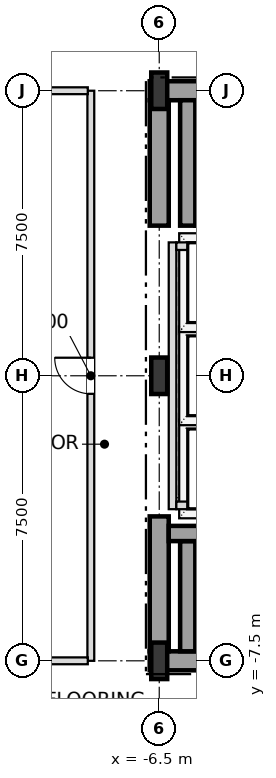
"""IFC4 building model, lengths in metres.
Left out: names, types, materials, properties, quantities, classifications, styles, units other than length and angle.
Written with IfcOpenShell. Run it as: python <this file> out.ifc"""

import sys

from ifc_helpers import new_model, si_unit, direction, frame, frame_2d, origin, origin_2d, place, context, subcontext, project, spatial, rectangle, i_section, extrude, element, fill, save


model = new_model("IFC4")
c1 = context("Model", 3, precision=1e-05, world=origin(), true_north=direction((0.0, 1.0)))
c2 = subcontext(c1, "Body", "Model", "MODEL_VIEW")
j1 = project(units=[si_unit("LENGTHUNIT", "METRE"), si_unit("PLANEANGLEUNIT", "RADIAN")], contexts=[c1])
p1 = place(None, origin())
s1 = spatial("IfcSite", under=j1, at=p1, CompositionType="ELEMENT")
p2 = place(p1, origin())
s2 = spatial("IfcBuilding", under=s1, at=p2, CompositionType="ELEMENT")
p3 = place(p2, frame((0.0, 0.0, 6.0)))
s3 = spatial("IfcBuildingStorey", under=s2, at=p3, CompositionType="ELEMENT", Elevation=6.0)
for number, where, z_axis, x_axis in (
    (1, (-6.5, -7.5, 0.0), (0.0, 0.0, 1.0), (1.0, 0.0, 0.0)),
    (2, (-6.5, 0.0, 0.0), (0.0, 0.0, 1.0), (1.0, 0.0, 0.0)),
    (3, (-6.5, 7.5, 0.0), (0.0, 0.0, 1.0), (1.0, 0.0, 0.0)),
):
    element("IfcColumn", number, at=place(p3, frame(where, z_axis=z_axis, x_axis=x_axis)), inside=s3, PredefinedType="COLUMN", context=c2, shape_type="SweptSolid", body=[
        extrude(i_section(OverallWidth=0.42, OverallDepth=0.96, WebThickness=0.022, FlangeThickness=0.034, at=origin_2d()), origin(), (0.0, 0.0, 1.0), 5.4),
    ])
p4 = place(p3, frame((-6.75, -7.5, 0.0), z_axis=(0.0, 0.0, 1.0), x_axis=(1.0, 0.0, 0.0)))
e4 = element("IfcWall", 4, at=p4, inside=s3, PredefinedType="SHEAR", context=c2, shape_type="SweptSolid", body=[
    extrude(rectangle(XDim=6.75, YDim=0.5, at=frame_2d((3.375, 0.0))), origin(), (0.0, 0.0, 1.0), 5.12),
])
p5 = place(p3, frame((-6.75, 7.5, 0.0), z_axis=(0.0, 0.0, 1.0), x_axis=(1.0, 0.0, 0.0)))
e5 = element("IfcWall", 5, at=p5, inside=s3, PredefinedType="SHEAR", context=c2, shape_type="SweptSolid", body=[
    extrude(rectangle(XDim=6.75, YDim=0.5, at=frame_2d((3.375, 0.0))), origin(), (0.0, 0.0, 1.0), 5.12),
])
p6 = place(p5, frame((1.65, 0.0, 0.0)))
e6 = element("IfcOpeningElement", 6, at=p6, cuts=e5, PredefinedType="OPENING", context=c2, shape_type="SweptSolid", body=[
    extrude(rectangle(XDim=1.05, YDim=2.15, at=frame_2d((0.525, 1.075))), frame((0.0, 0.26, 0.0), z_axis=(0.0, -1.0, 0.0), x_axis=(1.0, 0.0, 0.0)), (0.0, 0.0, 1.0), 0.52),
])
p7 = place(p3, frame((-6.5, -7.25, 0.0), z_axis=(0.0, 0.0, 1.0), x_axis=(0.0, 1.0, 0.0)))
e7 = element("IfcWall", 7, at=p7, inside=s3, PredefinedType="SHEAR", context=c2, shape_type="SweptSolid", body=[
    extrude(rectangle(XDim=3.55, YDim=0.5, at=frame_2d((1.775, 0.0))), origin(), (0.0, 0.0, 1.0), 5.12),
])
p8 = place(p3, frame((-6.5, 3.95, 0.0), z_axis=(0.0, 0.0, 1.0), x_axis=(0.0, 1.0, 0.0)))
e8 = element("IfcWall", 8, at=p8, inside=s3, PredefinedType="SHEAR", context=c2, shape_type="SweptSolid", body=[
    extrude(rectangle(XDim=3.3, YDim=0.5, at=frame_2d((1.65, 0.0))), origin(), (0.0, 0.0, 1.0), 5.12),
])
p9 = place(p3, frame((-5.75, -7.25, 0.0), z_axis=(0.0, 0.0, 1.0), x_axis=(0.0, 1.0, 0.0)))
e9 = element("IfcWall", 9, at=p9, inside=s3, PredefinedType="SHEAR", context=c2, shape_type="SweptSolid", body=[
    extrude(rectangle(XDim=2.9, YDim=0.4, at=frame_2d((1.45, 0.0))), origin(), (0.0, 0.0, 1.0), 5.12),
])
p10 = place(p3, frame((-6.25, -4.15, 0.0), z_axis=(0.0, 0.0, 1.0), x_axis=(1.0, 0.0, 0.0)))
e10 = element("IfcWall", 10, at=p10, inside=s3, PredefinedType="SHEAR", context=c2, shape_type="SweptSolid", body=[
    extrude(rectangle(XDim=7.78, YDim=0.4, at=frame_2d((3.89, 0.0))), origin(), (0.0, 0.0, 1.0), 5.12),
])
p11 = place(p3, frame((-5.55, 4.15, 0.0), z_axis=(0.0, 0.0, 1.0), x_axis=(1.0, 0.0, 0.0)))
e11 = element("IfcWall", 11, at=p11, inside=s3, PredefinedType="SHEAR", context=c2, shape_type="SweptSolid", body=[
    extrude(rectangle(XDim=7.08, YDim=0.4, at=frame_2d((3.54, 0.0))), origin(), (0.0, 0.0, 1.0), 5.12),
])
p12 = place(p3, frame((-5.75, 3.95, 0.0), z_axis=(0.0, 0.0, 1.0), x_axis=(0.0, 1.0, 0.0)))
e12 = element("IfcWall", 12, at=p12, inside=s3, PredefinedType="SHEAR", context=c2, shape_type="SweptSolid", body=[
    extrude(rectangle(XDim=3.3, YDim=0.4, at=frame_2d((1.65, 0.0))), origin(), (0.0, 0.0, 1.0), 5.12),
])
p13 = place(p3, frame((-6.15, -3.51, 0.0), z_axis=(0.0, 0.0, 1.0), x_axis=(0.0, 1.0, 0.0)))
e13 = element("IfcWall", 13, at=p13, inside=s3, PredefinedType="SOLIDWALL", context=c2, shape_type="SweptSolid", body=[
    extrude(rectangle(XDim=7.02, YDim=0.2, at=frame_2d((3.51, 0.0))), origin(), (0.0, 0.0, 1.0), 5.12),
])
for number, where, z_axis, x_axis in (
    (14, (-6.05, -3.41, 0.0), (0.0, 0.0, 1.0), (1.0, 0.0, 0.0)),
    (15, (-6.05, 3.41, 0.0), (0.0, 0.0, 1.0), (1.0, 0.0, 0.0)),
):
    element("IfcWall", number, at=place(p3, frame(where, z_axis=z_axis, x_axis=x_axis)), inside=s3, PredefinedType="SOLIDWALL", context=c2, shape_type="SweptSolid", body=[
        extrude(rectangle(XDim=2.2, YDim=0.2, at=frame_2d((1.1, 0.0))), origin(), (0.0, 0.0, 1.0), 5.12),
    ])
p14 = place(p3, frame((-8.3, -7.5, 0.0), z_axis=(0.0, 0.0, 1.0), x_axis=(0.0, 1.0, 0.0)))
e16 = element("IfcWall", 16, at=p14, inside=s3, PredefinedType="PARTITIONING", context=c2, shape_type="SweptSolid", body=[
    extrude(rectangle(XDim=15.0, YDim=0.18, at=frame_2d((7.5, 0.0))), origin(), (0.0, 0.0, 1.0), 5.12),
])
p15 = place(p14, frame((7.025, 0.0, 0.0)))
e17 = element("IfcOpeningElement", 17, at=p15, cuts=e16, PredefinedType="OPENING", context=c2, shape_type="SweptSolid", body=[
    extrude(rectangle(XDim=0.95, YDim=2.15, at=frame_2d((0.475, 1.075))), frame((0.0, 0.1, 0.0), z_axis=(0.0, -1.0, 0.0), x_axis=(1.0, 0.0, 0.0)), (0.0, 0.0, 1.0), 0.2),
])
for number, where, z_axis, x_axis in (
    (18, (-22.695, -7.5, 0.0), (0.0, 0.0, 1.0), (1.0, 0.0, 0.0)),
    (19, (-22.695, 7.5, 0.0), (0.0, 0.0, 1.0), (1.0, 0.0, 0.0)),
):
    element("IfcWall", number, at=place(p3, frame(where, z_axis=z_axis, x_axis=x_axis)), inside=s3, PredefinedType="PARTITIONING", context=c2, shape_type="SweptSolid", body=[
        extrude(rectangle(XDim=14.315, YDim=0.18, at=frame_2d((7.158, 0.0))), origin(), (0.0, 0.0, 1.0), 4.41),
    ])
p16 = place(p15, origin())
e20 = element("IfcDoor", 20, at=p16, inside=s3, OperationType="SINGLE_SWING_RIGHT", PredefinedType="DOOR", context=c2, shape_type="SweptSolid", body=[
    extrude(rectangle(XDim=0.95, YDim=2.15, at=frame_2d((0.475, 1.075))), frame((0.0, 0.025, 0.0), z_axis=(0.0, -1.0, 0.0), x_axis=(1.0, 0.0, 0.0)), (0.0, 0.0, 1.0), 0.05),
])
fill(e17, e20)
save(model, sys.argv[1])
